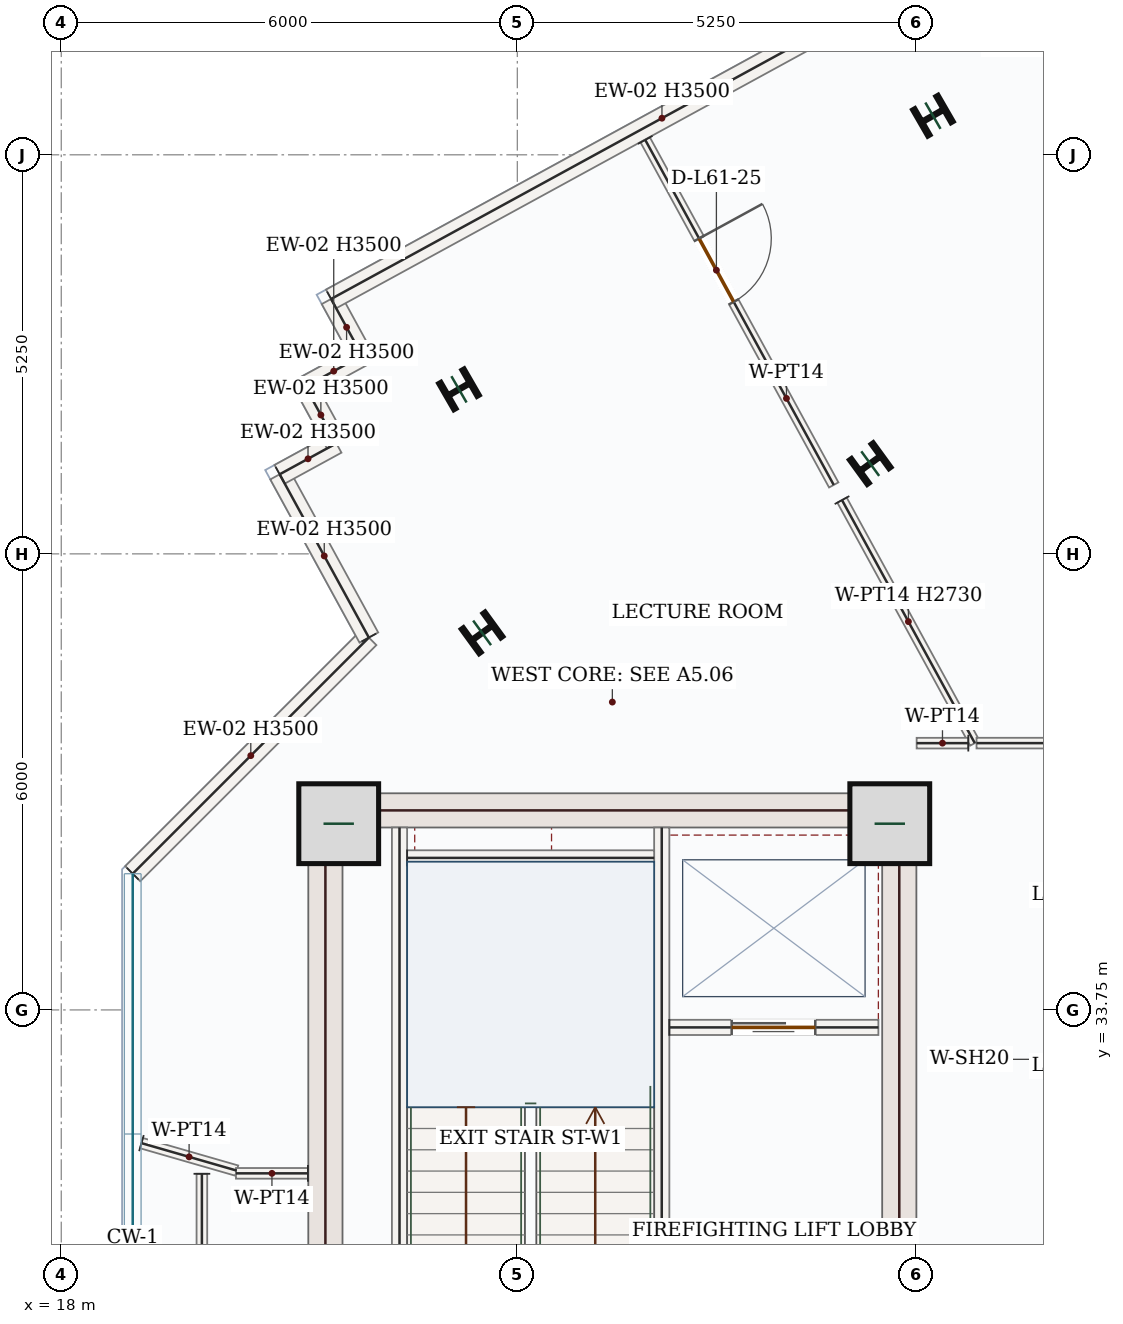
"""IFC4 building model, lengths in metres.
Left out: names, types, materials, properties, quantities, classifications, styles, units other than length and angle.
Written with IfcOpenShell. Run it as: python <this file> out.ifc"""

import sys

from ifc_helpers import new_model, si_unit, direction, frame, frame_2d, origin, origin_2d, place, context, subcontext, project, spatial, rectangle, i_section, extrude, source, transform, mapped, element, fill, save


model = new_model("IFC4")
c1 = context("Model", 3, precision=1e-05, world=origin(), true_north=direction((0.0, 1.0)))
c2 = subcontext(c1, "Body", "Model", "MODEL_VIEW")
j1 = project(units=[si_unit("LENGTHUNIT", "METRE"), si_unit("PLANEANGLEUNIT", "RADIAN")], contexts=[c1])
p1 = place(None, origin())
s1 = spatial("IfcSite", under=j1, at=p1, CompositionType="ELEMENT")
p2 = place(p1, origin())
s2 = spatial("IfcBuilding", under=s1, at=p2, CompositionType="ELEMENT")
p3 = place(p2, frame((0.0, 0.0, 257.85)))
s3 = spatial("IfcBuildingStorey", under=s2, at=p3, CompositionType="ELEMENT", Elevation=257.85)
m1 = source(origin(), c2, "Body", "SweptSolid", [
    extrude(rectangle(XDim=8.55, YDim=0.45, at=frame_2d((4.275, 0.0))), origin(), (0.0, 0.0, 1.0), 3.5),
])
p4 = place(p3, frame((21.475, 28.05, 0.0), z_axis=(0.0, 0.0, 1.0), x_axis=(0.0, 1.0, 0.0)))
e1 = element("IfcWall", 1, at=p4, inside=s3, PredefinedType="SHEAR", context=c2, shape_type="MappedRepresentation", body=[
    mapped(m1, transform((0.0, 0.0, 0.0), x_axis=(1.0, 0.0, 0.0), y_axis=(0.0, 1.0, 0.0), z_axis=(0.0, 0.0, 1.0), scale=1.0)),
])
p5 = place(p3, frame((29.025, 28.05, 0.0), z_axis=(0.0, 0.0, 1.0), x_axis=(0.0, 1.0, 0.0)))
e2 = element("IfcWall", 2, at=p5, inside=s3, PredefinedType="SHEAR", context=c2, shape_type="SweptSolid", body=[
    extrude(rectangle(XDim=8.55, YDim=0.45, at=frame_2d((4.275, 0.0))), origin(), (0.0, 0.0, 1.0), 3.5),
])
p6 = place(p5, frame((1.5, 0.0, 0.0)))
e3 = element("IfcOpeningElement", 3, at=p6, cuts=e2, PredefinedType="OPENING", context=c2, shape_type="SweptSolid", body=[
    extrude(rectangle(XDim=1.1, YDim=2.2, at=frame_2d((0.55, 1.1))), frame((0.0, 0.235, 0.0), z_axis=(0.0, -1.0, 0.0), x_axis=(1.0, 0.0, 0.0)), (0.0, 0.0, 1.0), 0.47),
])
m2 = source(origin(), c2, "Body", "SweptSolid", [
    extrude(rectangle(XDim=7.1, YDim=0.45, at=frame_2d((3.55, 0.0))), origin(), (0.0, 0.0, 1.0), 3.5),
])
p7 = place(p3, frame((21.7, 36.375, 0.0), z_axis=(0.0, 0.0, 1.0), x_axis=(1.0, 0.0, 0.0)))
e4 = element("IfcWall", 4, at=p7, inside=s3, PredefinedType="SHEAR", context=c2, shape_type="MappedRepresentation", body=[
    mapped(m2, transform((0.0, 0.0, 0.0), x_axis=(1.0, 0.0, 0.0), y_axis=(0.0, 1.0, 0.0), z_axis=(0.0, 0.0, 1.0), scale=1.0)),
])
m3 = source(origin(), c2, "Body", "SweptSolid", [
    extrude(rectangle(XDim=1.05, YDim=1.05, at=origin_2d()), origin(), (0.0, 0.0, 1.0), 3.75),
])
for number, where, z_axis, x_axis in (
    (5, (21.65, 36.2, 0.0), (0.0, 0.0, 1.0), (1.0, 0.0, 0.0)),
    (6, (28.9, 36.2, 0.0), (0.0, 0.0, 1.0), (1.0, 0.0, 0.0)),
):
    element("IfcColumn", number, at=place(p3, frame(where, z_axis=z_axis, x_axis=x_axis)), inside=s3, PredefinedType="COLUMN", context=c2, shape_type="MappedRepresentation", body=[
        mapped(m3, transform((0.0, 0.0, 0.0), x_axis=(1.0, 0.0, 0.0), y_axis=(0.0, 1.0, 0.0), z_axis=(0.0, 0.0, 1.0), scale=1.0)),
    ])
m4 = source(origin(), c2, "Body", "SweptSolid", [
    extrude(i_section(OverallWidth=0.399, OverallDepth=0.386, WebThickness=0.021, FlangeThickness=0.033, FilletRadius=0.018, at=origin_2d()), origin(), (0.0, 0.0, 1.0), 3.75),
])
for number, where, z_axis, x_axis in (
    (7, (28.643, 40.937, 0.0), (0.0, 0.0, 1.0), (-0.588, 0.809, 0.0)),
    (8, (23.536, 38.711, 0.0), (0.0, 0.0, 1.0), (-0.588, 0.809, 0.0)),
    (9, (29.468, 45.514, 0.0), (0.0, 0.0, 1.0), (-0.5, 0.866, 0.0)),
    (10, (23.232, 41.914, 0.0), (0.0, 0.0, 1.0), (-0.5, 0.866, 0.0)),
):
    element("IfcColumn", number, at=place(p3, frame(where, z_axis=z_axis, x_axis=x_axis)), inside=s3, PredefinedType="COLUMN", context=c2, shape_type="MappedRepresentation", body=[
        mapped(m4, transform((0.0, 0.0, 0.0), x_axis=(1.0, 0.0, 0.0), y_axis=(0.0, 1.0, 0.0), z_axis=(0.0, 0.0, 1.0), scale=1.0)),
    ])
m5 = source(origin(), c2, "Body", "SweptSolid", [
    extrude(rectangle(XDim=4.394, YDim=0.28, at=frame_2d((2.197, 0.0))), origin(), (0.0, 0.0, 1.0), 3.5),
])
p8 = place(p3, frame((18.94, 35.542, 0.0), z_axis=(0.0, 0.0, 1.0), x_axis=(0.707106781187, 0.707106781187, 0.0)))
e11 = element("IfcWall", 11, at=p8, inside=s3, PredefinedType="SOLIDWALL", context=c2, shape_type="MappedRepresentation", body=[
    mapped(m5, transform((0.0, 0.0, 0.0), x_axis=(1.0, 0.0, 0.0), y_axis=(0.0, 1.0, 0.0), z_axis=(0.0, 0.0, 1.0), scale=1.0)),
])
m6 = source(origin(), c2, "Body", "SweptSolid", [
    extrude(rectangle(XDim=2.448, YDim=0.28, at=frame_2d((1.224, 0.0))), origin(), (0.0, 0.0, 1.0), 3.5),
])
p9 = place(p3, frame((22.047, 38.649, 0.0), z_axis=(0.0, 0.0, 1.0), x_axis=(-0.47951595933, 0.877533158774, 0.0)))
e12 = element("IfcWall", 12, at=p9, inside=s3, PredefinedType="SOLIDWALL", context=c2, shape_type="MappedRepresentation", body=[
    mapped(m6, transform((0.0, 0.0, 0.0), x_axis=(1.0, 0.0, 0.0), y_axis=(0.0, 1.0, 0.0), z_axis=(0.0, 0.0, 1.0), scale=1.0)),
])
m7 = source(origin(), c2, "Body", "SweptSolid", [
    extrude(rectangle(XDim=0.85, YDim=0.28, at=frame_2d((0.425, 0.0))), origin(), (0.0, 0.0, 1.0), 3.5),
])
p10 = place(p3, frame((20.873, 40.796, 0.0), z_axis=(0.0, 0.0, 1.0), x_axis=(0.87752219781, 0.479536017782, 0.0)))
e13 = element("IfcWall", 13, at=p10, inside=s3, PredefinedType="SOLIDWALL", context=c2, shape_type="MappedRepresentation", body=[
    mapped(m7, transform((0.0, 0.0, 0.0), x_axis=(1.0, 0.0, 0.0), y_axis=(0.0, 1.0, 0.0), z_axis=(0.0, 0.0, 1.0), scale=1.0)),
])
m8 = source(origin(), c2, "Body", "SweptSolid", [
    extrude(rectangle(XDim=0.85, YDim=0.28, at=frame_2d((0.425, 0.0))), origin(), (0.0, 0.0, 1.0), 3.5),
])
for number, where, z_axis, x_axis in (
    (14, (21.619, 41.204, 0.0), (0.0, 0.0, 1.0), (-0.48, 0.877, 0.0)),
    (15, (21.211, 41.95, 0.0), (0.0, 0.0, 1.0), (0.878, 0.479, 0.0)),
):
    element("IfcWall", number, at=place(p3, frame(where, z_axis=z_axis, x_axis=x_axis)), inside=s3, PredefinedType="SOLIDWALL", context=c2, shape_type="MappedRepresentation", body=[
        mapped(m8, transform((0.0, 0.0, 0.0), x_axis=(1.0, 0.0, 0.0), y_axis=(0.0, 1.0, 0.0), z_axis=(0.0, 0.0, 1.0), scale=1.0)),
    ])
p11 = place(p3, frame((21.958, 42.357, 0.0), z_axis=(0.0, 0.0, 1.0), x_axis=(-0.479536017782, 0.87752219781, 0.0)))
e16 = element("IfcWall", 16, at=p11, inside=s3, PredefinedType="SOLIDWALL", context=c2, shape_type="MappedRepresentation", body=[
    mapped(m7, transform((0.0, 0.0, 0.0), x_axis=(1.0, 0.0, 0.0), y_axis=(0.0, 1.0, 0.0), z_axis=(0.0, 0.0, 1.0), scale=1.0)),
])
m9 = source(origin(), c2, "Body", "SweptSolid", [
    extrude(rectangle(XDim=9.92, YDim=0.28, at=frame_2d((4.96, 0.0))), origin(), (0.0, 0.0, 1.0), 3.5),
])
p12 = place(p3, frame((21.55, 43.104, 0.0), z_axis=(0.0, 0.0, 1.0), x_axis=(0.877572768104, 0.479443465574, 0.0)))
e17 = element("IfcWall", 17, at=p12, inside=s3, PredefinedType="SOLIDWALL", context=c2, shape_type="MappedRepresentation", body=[
    mapped(m9, transform((0.0, 0.0, 0.0), x_axis=(1.0, 0.0, 0.0), y_axis=(0.0, 1.0, 0.0), z_axis=(0.0, 0.0, 1.0), scale=1.0)),
])
m10 = source(origin(), c2, "Body", "SweptSolid", [
    extrude(rectangle(XDim=7.87, YDim=0.2, at=frame_2d((3.935, 0.0))), origin(), (0.0, 0.0, 1.0), 3.5),
])
p13 = place(p3, frame((22.45, 28.28, 0.0), z_axis=(0.0, 0.0, 1.0), x_axis=(0.0, 1.0, 0.0)))
e18 = element("IfcWall", 18, at=p13, inside=s3, PredefinedType="SOLIDWALL", context=c2, shape_type="MappedRepresentation", body=[
    mapped(m10, transform((0.0, 0.0, 0.0), x_axis=(1.0, 0.0, 0.0), y_axis=(0.0, 1.0, 0.0), z_axis=(0.0, 0.0, 1.0), scale=1.0)),
])
p14 = place(p3, frame((25.9, 28.15, 0.0), z_axis=(0.0, 0.0, 1.0), x_axis=(0.0, 1.0, 0.0)))
e19 = element("IfcWall", 19, at=p14, inside=s3, PredefinedType="SOLIDWALL", context=c2, shape_type="SweptSolid", body=[
    extrude(rectangle(XDim=8.0, YDim=0.2, at=frame_2d((4.0, 0.0))), origin(), (0.0, 0.0, 1.0), 3.5),
])
p15 = place(p14, frame((0.4, 0.0, 0.0)))
e20 = element("IfcOpeningElement", 20, at=p15, cuts=e19, PredefinedType="OPENING", context=c2, shape_type="SweptSolid", body=[
    extrude(rectangle(XDim=1.05, YDim=2.15, at=frame_2d((0.525, 1.075))), frame((0.0, 0.11, 0.0), z_axis=(0.0, -1.0, 0.0), x_axis=(1.0, 0.0, 0.0)), (0.0, 0.0, 1.0), 0.22),
])
m11 = source(origin(), c2, "Body", "SweptSolid", [
    extrude(rectangle(XDim=3.25, YDim=0.2, at=frame_2d((1.625, 0.0))), origin(), (0.0, 0.0, 1.0), 3.5),
])
p16 = place(p3, frame((22.55, 35.75, 0.0), z_axis=(0.0, 0.0, 1.0), x_axis=(1.0, 0.0, 0.0)))
e21 = element("IfcWall", 21, at=p16, inside=s3, PredefinedType="SOLIDWALL", context=c2, shape_type="MappedRepresentation", body=[
    mapped(m11, transform((0.0, 0.0, 0.0), x_axis=(1.0, 0.0, 0.0), y_axis=(0.0, 1.0, 0.0), z_axis=(0.0, 0.0, 1.0), scale=1.0)),
])
p17 = place(p3, frame((26.0, 33.52, 0.0), z_axis=(0.0, 0.0, 1.0), x_axis=(1.0, 0.0, 0.0)))
e22 = element("IfcWall", 22, at=p17, inside=s3, PredefinedType="SOLIDWALL", context=c2, shape_type="SweptSolid", body=[
    extrude(rectangle(XDim=2.75, YDim=0.2, at=frame_2d((1.375, 0.0))), origin(), (0.0, 0.0, 1.0), 3.5),
])
p18 = place(p17, frame((0.82, 0.0, 0.0)))
e23 = element("IfcOpeningElement", 23, at=p18, cuts=e22, PredefinedType="OPENING", context=c2, shape_type="SweptSolid", body=[
    extrude(rectangle(XDim=1.1, YDim=2.15, at=frame_2d((0.55, 1.075))), frame((0.0, 0.11, 0.0), z_axis=(0.0, -1.0, 0.0), x_axis=(1.0, 0.0, 0.0)), (0.0, 0.0, 1.0), 0.22),
])
m12 = source(origin(), c2, "Body", "SweptSolid", [
    extrude(rectangle(XDim=1.305, YDim=0.14, at=frame_2d((0.652, 0.0))), origin(), (0.0, 0.0, 1.0), 3.5),
])
p19 = place(p3, frame((19.055, 31.998, 0.0), z_axis=(0.0, 0.0, 1.0), x_axis=(0.960836047515, -0.2771174657, 0.0)))
e24 = element("IfcWall", 24, at=p19, inside=s3, PredefinedType="PARTITIONING", context=c2, shape_type="MappedRepresentation", body=[
    mapped(m12, transform((0.0, 0.0, 0.0), x_axis=(1.0, 0.0, 0.0), y_axis=(0.0, 1.0, 0.0), z_axis=(0.0, 0.0, 1.0), scale=1.0)),
])
p20 = place(p3, frame((19.85, 31.594, 0.0), z_axis=(0.0, 0.0, 1.0), x_axis=(2.657666e-05, -0.999999999647, 0.0)))
e25 = element("IfcWall", 25, at=p20, inside=s3, PredefinedType="PARTITIONING", context=c2, shape_type="SweptSolid", body=[
    extrude(rectangle(XDim=9.186, YDim=0.14, at=frame_2d((4.593, 0.0))), origin(), (0.0, 0.0, 1.0), 3.5),
])
p21 = place(p20, frame((2.883, 0.0, 0.0)))
e26 = element("IfcOpeningElement", 26, at=p21, cuts=e25, PredefinedType="OPENING", context=c2, shape_type="SweptSolid", body=[
    extrude(rectangle(XDim=0.95, YDim=2.15, at=frame_2d((0.475, 1.075))), frame((0.0, 0.08, 0.0), z_axis=(0.0, -1.0, 0.0), x_axis=(1.0, 0.0, 0.0)), (0.0, 0.0, 1.0), 0.16),
])
p22 = place(p3, frame((25.683, 45.196, 0.0), z_axis=(0.0, 0.0, 1.0), x_axis=(0.479427410708, -0.877581539153, 0.0)))
e27 = element("IfcWall", 27, at=p22, inside=s3, PredefinedType="PARTITIONING", context=c2, shape_type="SweptSolid", body=[
    extrude(rectangle(XDim=5.173, YDim=0.14, at=frame_2d((2.586, 0.0))), origin(), (0.0, 0.0, 1.0), 3.5),
])
p23 = place(p22, frame((1.478, 0.0, 0.0)))
e28 = element("IfcOpeningElement", 28, at=p23, cuts=e27, PredefinedType="OPENING", context=c2, shape_type="SweptSolid", body=[
    extrude(rectangle(XDim=0.95, YDim=2.15, at=frame_2d((0.475, 1.075))), frame((0.0, 0.08, 0.0), z_axis=(0.0, -1.0, 0.0), x_axis=(1.0, 0.0, 0.0)), (0.0, 0.0, 1.0), 0.16),
])
m13 = source(origin(), c2, "Body", "SweptSolid", [
    extrude(rectangle(XDim=3.644, YDim=0.14, at=frame_2d((1.822, 0.0))), origin(), (0.0, 0.0, 1.0), 2.73),
])
p24 = place(p3, frame((28.271, 40.457, 0.0), z_axis=(0.0, 0.0, 1.0), x_axis=(0.479509272429, -0.877536812706, 0.0)))
e29 = element("IfcWall", 29, at=p24, inside=s3, PredefinedType="PARTITIONING", context=c2, shape_type="MappedRepresentation", body=[
    mapped(m13, transform((0.0, 0.0, 0.0), x_axis=(1.0, 0.0, 0.0), y_axis=(0.0, 1.0, 0.0), z_axis=(0.0, 0.0, 1.0), scale=1.0)),
])
m14 = source(origin(), c2, "Body", "SweptSolid", [
    extrude(rectangle(XDim=0.68, YDim=0.14, at=frame_2d((0.34, 0.0))), origin(), (0.0, 0.0, 1.0), 3.5),
])
p25 = place(p3, frame((29.933, 37.26, 0.0), z_axis=(0.0, 0.0, 1.0), x_axis=(-0.999999741957, -0.000718390619, 0.0)))
e30 = element("IfcWall", 30, at=p25, inside=s3, PredefinedType="PARTITIONING", context=c2, shape_type="MappedRepresentation", body=[
    mapped(m14, transform((0.0, 0.0, 0.0), x_axis=(1.0, 0.0, 0.0), y_axis=(0.0, 1.0, 0.0), z_axis=(0.0, 0.0, 1.0), scale=1.0)),
])
m15 = source(origin(), c2, "Body", "SweptSolid", [
    extrude(rectangle(XDim=0.947, YDim=0.14, at=frame_2d((0.474, 0.0))), origin(), (0.0, 0.0, 1.0), 3.5),
])
p26 = place(p3, frame((21.245, 31.6, 0.0), z_axis=(0.0, 0.0, 1.0), x_axis=(-1.0, 0.0, 0.0)))
e31 = element("IfcWall", 31, at=p26, inside=s3, PredefinedType="PARTITIONING", context=c2, shape_type="MappedRepresentation", body=[
    mapped(m15, transform((0.0, 0.0, 0.0), x_axis=(1.0, 0.0, 0.0), y_axis=(0.0, 1.0, 0.0), z_axis=(0.0, 0.0, 1.0), scale=1.0)),
])
p27 = place(p3, frame((38.998, 37.26, 0.0), z_axis=(0.0, 0.0, 1.0), x_axis=(-1.0, 0.0, 0.0)))
e32 = element("IfcWall", 32, at=p27, inside=s3, PredefinedType="PARTITIONING", context=c2, shape_type="SweptSolid", body=[
    extrude(rectangle(XDim=8.956, YDim=0.14, at=frame_2d((4.478, 0.0))), origin(), (0.0, 0.0, 1.0), 3.5),
])
p28 = place(p27, frame((2.802, 0.0, 0.0)))
e33 = element("IfcOpeningElement", 33, at=p28, cuts=e32, PredefinedType="OPENING", context=c2, shape_type="SweptSolid", body=[
    extrude(rectangle(XDim=0.95, YDim=2.15, at=frame_2d((0.475, 1.075))), frame((0.0, 0.08, 0.0), z_axis=(0.0, -1.0, 0.0), x_axis=(1.0, 0.0, 0.0)), (0.0, 0.0, 1.0), 0.16),
])
m16 = source(origin(), c2, "Body", "SweptSolid", [
    extrude(rectangle(XDim=1.1, YDim=2.15, at=frame_2d((0.55, 1.075))), frame((0.0, 0.025, 0.0), z_axis=(0.0, -1.0, 0.0), x_axis=(1.0, 0.0, 0.0)), (0.0, 0.0, 1.0), 0.05),
])
p29 = place(p18, origin())
e34 = element("IfcDoor", 34, at=p29, inside=s3, OperationType="DOUBLE_DOOR_SLIDING", PredefinedType="DOOR", context=c2, shape_type="MappedRepresentation", body=[
    mapped(m16, transform((0.0, 0.0, 0.0), x_axis=(1.0, 0.0, 0.0), y_axis=(0.0, 1.0, 0.0), z_axis=(0.0, 0.0, 1.0), scale=1.0)),
])
fill(e23, e34)
m17 = source(origin(), c2, "Body", "SweptSolid", [
    extrude(rectangle(XDim=0.95, YDim=2.15, at=frame_2d((0.475, 1.075))), frame((0.0, 0.025, 0.0), z_axis=(0.0, -1.0, 0.0), x_axis=(1.0, 0.0, 0.0)), (0.0, 0.0, 1.0), 0.05),
])
p30 = place(p23, origin())
e35 = element("IfcDoor", 35, at=p30, inside=s3, OperationType="SINGLE_SWING_LEFT", PredefinedType="DOOR", context=c2, shape_type="MappedRepresentation", body=[
    mapped(m17, transform((0.0, 0.0, 0.0), x_axis=(1.0, 0.0, 0.0), y_axis=(0.0, 1.0, 0.0), z_axis=(0.0, 0.0, 1.0), scale=1.0)),
])
fill(e28, e35)
save(model, sys.argv[1])
